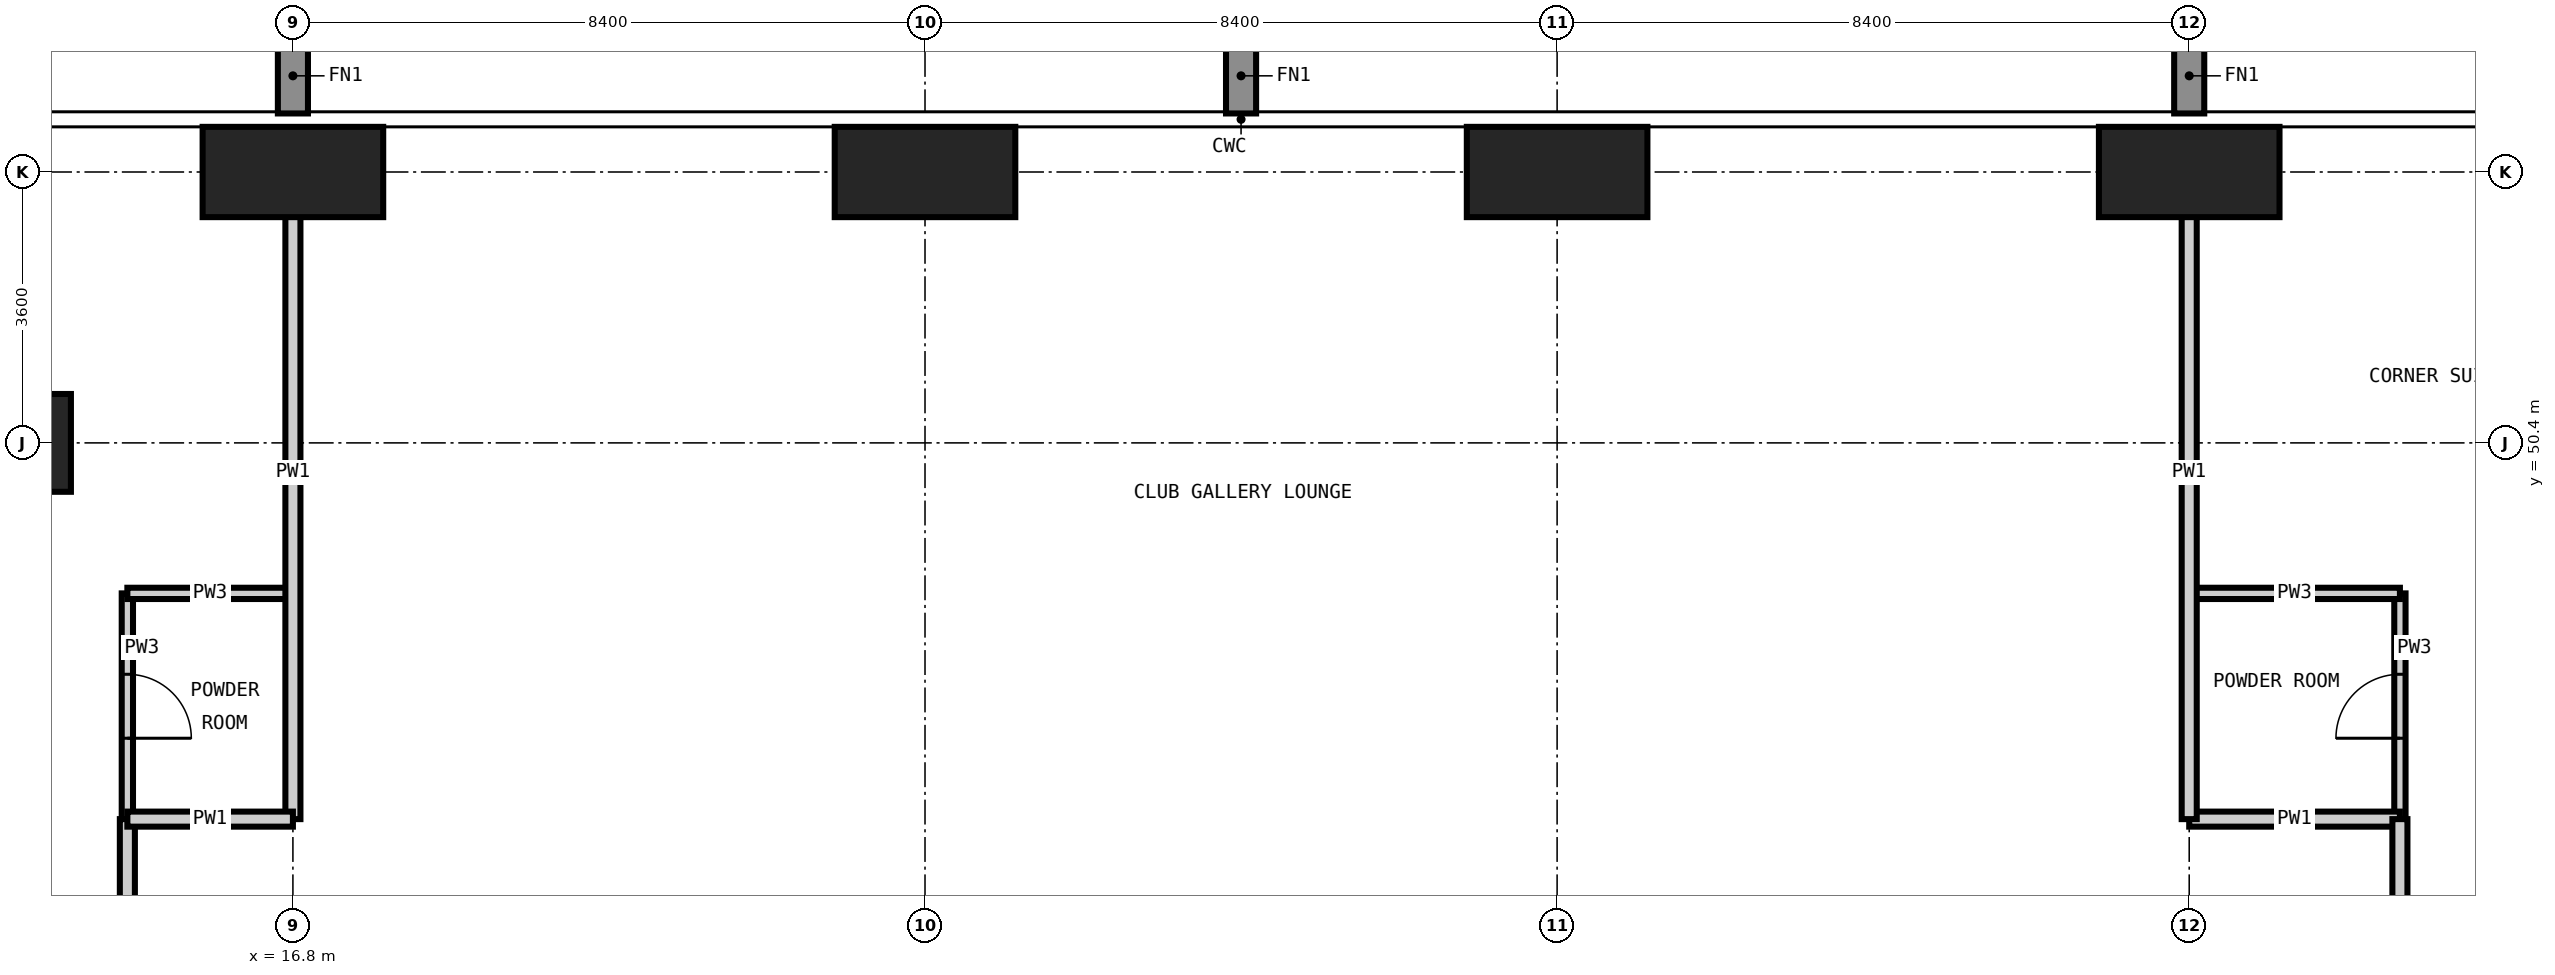
"""IFC4 building model, lengths in metres.
Left out: names, types, materials, properties, quantities, classifications, styles, units other than length and angle.
Written with IfcOpenShell. Run it as: python <this file> out.ifc"""

import sys

from ifc_helpers import new_model, si_unit, direction, frame, frame_2d, origin, origin_2d, place, context, subcontext, project, spatial, rectangle, extrude, element, fill, save


model = new_model("IFC4")
c1 = context("Model", 3, precision=1e-05, world=origin(), true_north=direction((0.0, 1.0)))
c2 = subcontext(c1, "Body", "Model", "MODEL_VIEW")
j1 = project(units=[si_unit("LENGTHUNIT", "METRE"), si_unit("PLANEANGLEUNIT", "RADIAN")], contexts=[c1])
p1 = place(None, origin())
s1 = spatial("IfcSite", under=j1, at=p1, CompositionType="ELEMENT")
p2 = place(p1, origin())
s2 = spatial("IfcBuilding", under=s1, at=p2, CompositionType="ELEMENT")
p3 = place(p2, frame((0.0, 0.0, 180.6)))
s3 = spatial("IfcBuildingStorey", under=s2, at=p3, CompositionType="ELEMENT", Elevation=180.6)
p4 = place(p3, frame((13.2, 50.4, -0.35), z_axis=(0.0, 0.0, 1.0), x_axis=(1.0, 0.0, 0.0)))
e1 = element("IfcColumn", 1, at=p4, inside=s3, PredefinedType="COLUMN", context=c2, shape_type="SweptSolid", body=[
    extrude(rectangle(XDim=1.3, YDim=1.3, at=origin_2d()), origin(), (0.0, 0.0, 1.0), 3.6),
])
for number, where, z_axis, x_axis in (
    (2, (16.8, 54.0, -0.35), (0.0, 0.0, 1.0), (1.0, 0.0, 0.0)),
    (3, (25.2, 54.0, -0.35), (0.0, 0.0, 1.0), (1.0, 0.0, 0.0)),
    (4, (33.6, 54.0, -0.35), (0.0, 0.0, 1.0), (1.0, 0.0, 0.0)),
    (5, (42.0, 54.0, -0.35), (0.0, 0.0, 1.0), (1.0, 0.0, 0.0)),
):
    element("IfcColumn", number, at=place(p3, frame(where, z_axis=z_axis, x_axis=x_axis)), inside=s3, PredefinedType="COLUMN", context=c2, shape_type="SweptSolid", body=[
        extrude(rectangle(XDim=2.4, YDim=1.2, at=origin_2d()), origin(), (0.0, 0.0, 1.0), 3.6),
    ])
p5 = place(p3, frame((14.6, 45.4, 0.0), z_axis=(0.0, 0.0, 1.0), x_axis=(0.0, 1.0, 0.0)))
e6 = element("IfcWall", 6, at=p5, inside=s3, PredefinedType="PARTITIONING", context=c2, shape_type="SweptSolid", body=[
    extrude(rectangle(XDim=3.0, YDim=0.15, at=frame_2d((1.5, 0.0))), origin(), (0.0, 0.0, 1.0), 3.25),
])
p6 = place(p5, frame((1.075, 0.0, 0.0)))
e7 = element("IfcOpeningElement", 7, at=p6, cuts=e6, PredefinedType="OPENING", context=c2, shape_type="SweptSolid", body=[
    extrude(rectangle(XDim=0.85, YDim=2.1, at=frame_2d((0.425, 1.05))), frame((0.0, 0.085, 0.0), z_axis=(0.0, -1.0, 0.0), x_axis=(1.0, 0.0, 0.0)), (0.0, 0.0, 1.0), 0.17),
])
p7 = place(p3, frame((44.8, 45.4, 0.0), z_axis=(0.0, 0.0, 1.0), x_axis=(0.0, 1.0, 0.0)))
e8 = element("IfcWall", 8, at=p7, inside=s3, PredefinedType="PARTITIONING", context=c2, shape_type="SweptSolid", body=[
    extrude(rectangle(XDim=3.0, YDim=0.15, at=frame_2d((1.5, 0.0))), origin(), (0.0, 0.0, 1.0), 3.25),
])
p8 = place(p7, frame((1.075, 0.0, 0.0)))
e9 = element("IfcOpeningElement", 9, at=p8, cuts=e8, PredefinedType="OPENING", context=c2, shape_type="SweptSolid", body=[
    extrude(rectangle(XDim=0.85, YDim=2.1, at=frame_2d((0.425, 1.05))), frame((0.0, 0.085, 0.0), z_axis=(0.0, -1.0, 0.0), x_axis=(1.0, 0.0, 0.0)), (0.0, 0.0, 1.0), 0.17),
])
p9 = place(p3, frame((14.6, 48.4, 0.0), z_axis=(0.0, 0.0, 1.0), x_axis=(1.0, 0.0, 0.0)))
e10 = element("IfcWall", 10, at=p9, inside=s3, PredefinedType="PARTITIONING", context=c2, shape_type="SweptSolid", body=[
    extrude(rectangle(XDim=2.2, YDim=0.15, at=frame_2d((1.1, 0.0))), origin(), (0.0, 0.0, 1.0), 3.25),
])
p10 = place(p3, frame((42.0, 48.4, 0.0), z_axis=(0.0, 0.0, 1.0), x_axis=(1.0, 0.0, 0.0)))
e11 = element("IfcWall", 11, at=p10, inside=s3, PredefinedType="PARTITIONING", context=c2, shape_type="SweptSolid", body=[
    extrude(rectangle(XDim=2.8, YDim=0.15, at=frame_2d((1.4, 0.0))), origin(), (0.0, 0.0, 1.0), 3.25),
])
p11 = place(p3, frame((14.6, 14.6, 0.0), z_axis=(0.0, 0.0, 1.0), x_axis=(0.0, 1.0, 0.0)))
e12 = element("IfcWall", 12, at=p11, inside=s3, PredefinedType="PARTITIONING", context=c2, shape_type="SweptSolid", body=[
    extrude(rectangle(XDim=30.8, YDim=0.2, at=frame_2d((15.4, 0.0))), origin(), (0.0, 0.0, 1.0), 3.25),
])
p12 = place(p11, frame((5.9, 0.0, 0.0)))
e13 = element("IfcOpeningElement", 13, at=p12, cuts=e12, PredefinedType="OPENING", context=c2, shape_type="SweptSolid", body=[
    extrude(rectangle(XDim=1.0, YDim=2.2, at=frame_2d((0.5, 1.1))), frame((0.0, 0.11, 0.0), z_axis=(0.0, -1.0, 0.0), x_axis=(1.0, 0.0, 0.0)), (0.0, 0.0, 1.0), 0.22),
])
p13 = place(p11, frame((11.8, 0.0, 0.0)))
e14 = element("IfcOpeningElement", 14, at=p13, cuts=e12, PredefinedType="OPENING", context=c2, shape_type="SweptSolid", body=[
    extrude(rectangle(XDim=1.8, YDim=2.4, at=frame_2d((0.9, 1.2))), frame((0.0, 0.11, 0.0), z_axis=(0.0, -1.0, 0.0), x_axis=(1.0, 0.0, 0.0)), (0.0, 0.0, 1.0), 0.22),
])
p14 = place(p11, frame((19.425, 0.0, 0.0)))
e15 = element("IfcOpeningElement", 15, at=p14, cuts=e12, PredefinedType="OPENING", context=c2, shape_type="SweptSolid", body=[
    extrude(rectangle(XDim=1.0, YDim=2.2, at=frame_2d((0.5, 1.1))), frame((0.0, 0.11, 0.0), z_axis=(0.0, -1.0, 0.0), x_axis=(1.0, 0.0, 0.0)), (0.0, 0.0, 1.0), 0.22),
])
p15 = place(p11, frame((24.8, 0.0, 0.0)))
e16 = element("IfcOpeningElement", 16, at=p15, cuts=e12, PredefinedType="OPENING", context=c2, shape_type="SweptSolid", body=[
    extrude(rectangle(XDim=1.0, YDim=2.2, at=frame_2d((0.5, 1.1))), frame((0.0, 0.11, 0.0), z_axis=(0.0, -1.0, 0.0), x_axis=(1.0, 0.0, 0.0)), (0.0, 0.0, 1.0), 0.22),
])
p16 = place(p11, frame((0.6, 0.0, 0.0)))
e17 = element("IfcOpeningElement", 17, at=p16, cuts=e12, PredefinedType="OPENING", context=c2, shape_type="SweptSolid", body=[
    extrude(rectangle(XDim=1.0, YDim=2.2, at=frame_2d((0.5, 1.1))), frame((0.0, 0.11, 0.0), z_axis=(0.0, -1.0, 0.0), x_axis=(1.0, 0.0, 0.0)), (0.0, 0.0, 1.0), 0.22),
])
p17 = place(p11, frame((28.6, 0.0, 0.0)))
e18 = element("IfcOpeningElement", 18, at=p17, cuts=e12, PredefinedType="OPENING", context=c2, shape_type="SweptSolid", body=[
    extrude(rectangle(XDim=1.0, YDim=2.2, at=frame_2d((0.5, 1.1))), frame((0.0, 0.11, 0.0), z_axis=(0.0, -1.0, 0.0), x_axis=(1.0, 0.0, 0.0)), (0.0, 0.0, 1.0), 0.22),
])
p18 = place(p3, frame((16.8, 45.4, 0.0), z_axis=(0.0, 0.0, 1.0), x_axis=(0.0, 1.0, 0.0)))
e19 = element("IfcWall", 19, at=p18, inside=s3, PredefinedType="PARTITIONING", context=c2, shape_type="SweptSolid", body=[
    extrude(rectangle(XDim=9.218, YDim=0.2, at=frame_2d((4.609, 0.0))), origin(), (0.0, 0.0, 1.0), 3.25),
])
p19 = place(p3, frame((14.6, 45.4, 0.0), z_axis=(0.0, 0.0, 1.0), x_axis=(1.0, 0.0, 0.0)))
e20 = element("IfcWall", 20, at=p19, inside=s3, PredefinedType="PARTITIONING", context=c2, shape_type="SweptSolid", body=[
    extrude(rectangle(XDim=2.2, YDim=0.2, at=frame_2d((1.1, 0.0))), origin(), (0.0, 0.0, 1.0), 3.25),
])
p20 = place(p3, frame((42.0, 45.4, 0.0), z_axis=(0.0, 0.0, 1.0), x_axis=(1.0, 0.0, 0.0)))
e21 = element("IfcWall", 21, at=p20, inside=s3, PredefinedType="PARTITIONING", context=c2, shape_type="SweptSolid", body=[
    extrude(rectangle(XDim=2.8, YDim=0.2, at=frame_2d((1.4, 0.0))), origin(), (0.0, 0.0, 1.0), 3.25),
])
p21 = place(p3, frame((42.0, 54.618, 0.0), z_axis=(0.0, 0.0, 1.0), x_axis=(0.0, -1.0, 0.0)))
e22 = element("IfcWall", 22, at=p21, inside=s3, PredefinedType="PARTITIONING", context=c2, shape_type="SweptSolid", body=[
    extrude(rectangle(XDim=9.218, YDim=0.2, at=frame_2d((4.609, 0.0))), origin(), (0.0, 0.0, 1.0), 3.25),
])
p22 = place(p3, frame((44.8, 45.4, 0.0), z_axis=(0.0, 0.0, 1.0), x_axis=(0.0, -1.0, 0.0)))
e23 = element("IfcWall", 23, at=p22, inside=s3, PredefinedType="PARTITIONING", context=c2, shape_type="SweptSolid", body=[
    extrude(rectangle(XDim=30.8, YDim=0.2, at=frame_2d((15.4, 0.0))), origin(), (0.0, 0.0, 1.0), 3.25),
])
p23 = place(p22, frame((26.0, 0.0, 0.0)))
e24 = element("IfcOpeningElement", 24, at=p23, cuts=e23, PredefinedType="OPENING", context=c2, shape_type="SweptSolid", body=[
    extrude(rectangle(XDim=1.0, YDim=2.2, at=frame_2d((0.5, 1.1))), frame((0.0, 0.11, 0.0), z_axis=(0.0, -1.0, 0.0), x_axis=(1.0, 0.0, 0.0)), (0.0, 0.0, 1.0), 0.22),
])
p24 = place(p22, frame((21.8, 0.0, 0.0)))
e25 = element("IfcOpeningElement", 25, at=p24, cuts=e23, PredefinedType="OPENING", context=c2, shape_type="SweptSolid", body=[
    extrude(rectangle(XDim=1.0, YDim=2.2, at=frame_2d((0.5, 1.1))), frame((0.0, 0.11, 0.0), z_axis=(0.0, -1.0, 0.0), x_axis=(1.0, 0.0, 0.0)), (0.0, 0.0, 1.0), 0.22),
])
p25 = place(p22, frame((17.6, 0.0, 0.0)))
e26 = element("IfcOpeningElement", 26, at=p25, cuts=e23, PredefinedType="OPENING", context=c2, shape_type="SweptSolid", body=[
    extrude(rectangle(XDim=1.0, YDim=2.2, at=frame_2d((0.5, 1.1))), frame((0.0, 0.11, 0.0), z_axis=(0.0, -1.0, 0.0), x_axis=(1.0, 0.0, 0.0)), (0.0, 0.0, 1.0), 0.22),
])
p26 = place(p22, frame((13.4, 0.0, 0.0)))
e27 = element("IfcOpeningElement", 27, at=p26, cuts=e23, PredefinedType="OPENING", context=c2, shape_type="SweptSolid", body=[
    extrude(rectangle(XDim=1.0, YDim=2.2, at=frame_2d((0.5, 1.1))), frame((0.0, 0.11, 0.0), z_axis=(0.0, -1.0, 0.0), x_axis=(1.0, 0.0, 0.0)), (0.0, 0.0, 1.0), 0.22),
])
p27 = place(p22, frame((9.2, 0.0, 0.0)))
e28 = element("IfcOpeningElement", 28, at=p27, cuts=e23, PredefinedType="OPENING", context=c2, shape_type="SweptSolid", body=[
    extrude(rectangle(XDim=1.0, YDim=2.2, at=frame_2d((0.5, 1.1))), frame((0.0, 0.11, 0.0), z_axis=(0.0, -1.0, 0.0), x_axis=(1.0, 0.0, 0.0)), (0.0, 0.0, 1.0), 0.22),
])
p28 = place(p22, frame((5.0, 0.0, 0.0)))
e29 = element("IfcOpeningElement", 29, at=p28, cuts=e23, PredefinedType="OPENING", context=c2, shape_type="SweptSolid", body=[
    extrude(rectangle(XDim=1.0, YDim=2.2, at=frame_2d((0.5, 1.1))), frame((0.0, 0.11, 0.0), z_axis=(0.0, -1.0, 0.0), x_axis=(1.0, 0.0, 0.0)), (0.0, 0.0, 1.0), 0.22),
])
p29 = place(p22, frame((29.2, 0.0, 0.0)))
e30 = element("IfcOpeningElement", 30, at=p29, cuts=e23, PredefinedType="OPENING", context=c2, shape_type="SweptSolid", body=[
    extrude(rectangle(XDim=1.0, YDim=2.2, at=frame_2d((0.5, 1.1))), frame((0.0, 0.11, 0.0), z_axis=(0.0, -1.0, 0.0), x_axis=(1.0, 0.0, 0.0)), (0.0, 0.0, 1.0), 0.22),
])
p30 = place(p22, frame((1.2, 0.0, 0.0)))
e31 = element("IfcOpeningElement", 31, at=p30, cuts=e23, PredefinedType="OPENING", context=c2, shape_type="SweptSolid", body=[
    extrude(rectangle(XDim=1.0, YDim=2.2, at=frame_2d((0.5, 1.1))), frame((0.0, 0.11, 0.0), z_axis=(0.0, -1.0, 0.0), x_axis=(1.0, 0.0, 0.0)), (0.0, 0.0, 1.0), 0.22),
])
p31 = place(p8, origin())
e32 = element("IfcDoor", 32, at=p31, inside=s3, OperationType="SINGLE_SWING_LEFT", PredefinedType="DOOR", context=c2, shape_type="SweptSolid", body=[
    extrude(rectangle(XDim=0.85, YDim=2.1, at=frame_2d((0.425, 1.05))), frame((0.0, 0.025, 0.0), z_axis=(0.0, -1.0, 0.0), x_axis=(1.0, 0.0, 0.0)), (0.0, 0.0, 1.0), 0.05),
])
fill(e9, e32)
p32 = place(p6, frame((0.85, 0.0, 0.0), z_axis=(0.0, 0.0, 1.0), x_axis=(-1.0, 0.0, 0.0)))
e33 = element("IfcDoor", 33, at=p32, inside=s3, OperationType="SINGLE_SWING_RIGHT", PredefinedType="DOOR", context=c2, shape_type="SweptSolid", body=[
    extrude(rectangle(XDim=0.85, YDim=2.1, at=frame_2d((0.425, 1.05))), frame((0.0, 0.025, 0.0), z_axis=(0.0, -1.0, 0.0), x_axis=(1.0, 0.0, 0.0)), (0.0, 0.0, 1.0), 0.05),
])
fill(e7, e33)
save(model, sys.argv[1])
